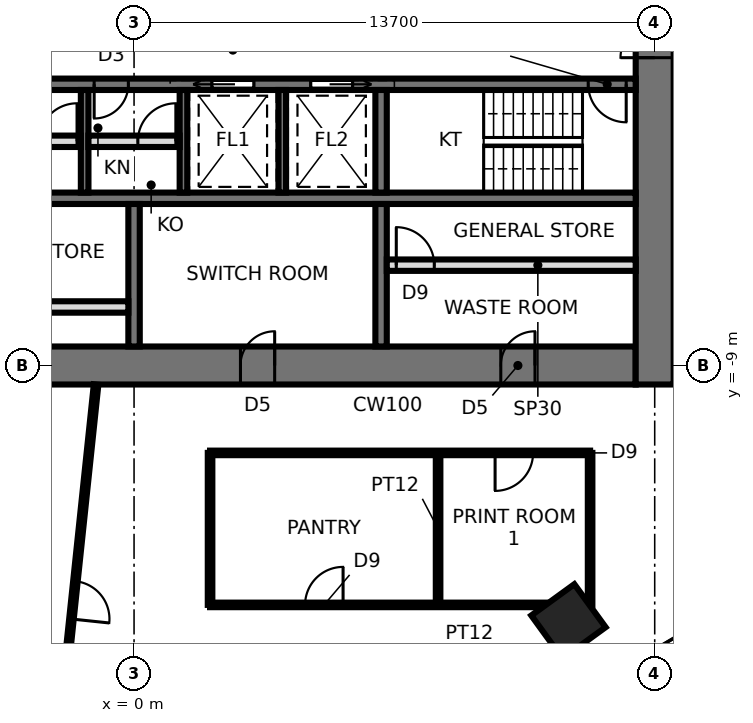
"""IFC4 building model, lengths in metres.
Left out: names, types, materials, properties, quantities, classifications, styles, units other than length and angle.
Written with IfcOpenShell. Run it as: python <this file> out.ifc"""

import sys

from ifc_helpers import new_model, si_unit, direction, frame, frame_2d, origin, origin_2d, place, context, subcontext, project, spatial, rectangle, extrude, element, fill, save


model = new_model("IFC4")
c1 = context("Model", 3, precision=1e-05, world=origin(), true_north=direction((0.0, 1.0)))
c2 = subcontext(c1, "Body", "Model", "MODEL_VIEW")
j1 = project(units=[si_unit("LENGTHUNIT", "METRE"), si_unit("PLANEANGLEUNIT", "RADIAN")], contexts=[c1])
p1 = place(None, origin())
s1 = spatial("IfcSite", under=j1, at=p1, CompositionType="ELEMENT")
p2 = place(p1, origin())
s2 = spatial("IfcBuilding", under=s1, at=p2, CompositionType="ELEMENT")
p3 = place(p2, frame((0.0, 0.0, 172.1)))
s3 = spatial("IfcBuildingStorey", under=s2, at=p3, CompositionType="ELEMENT", Elevation=172.1)
p4 = place(p3, frame((11.43, -15.733, 0.0), z_axis=(0.0, 0.0, 1.0), x_axis=(0.587785252292, -0.809016994375, 0.0)))
e1 = element("IfcColumn", 1, at=p4, inside=s3, PredefinedType="COLUMN", context=c2, shape_type="SweptSolid", body=[
    extrude(rectangle(XDim=1.4, YDim=1.4, at=origin_2d()), origin(), (0.0, 0.0, 1.0), 3.9),
])
p5 = place(p3, frame((-13.2, -9.0, 0.0), z_axis=(0.0, 0.0, 1.0), x_axis=(1.0, 0.0, 0.0)))
e2 = element("IfcWall", 2, at=p5, inside=s3, PredefinedType="SHEAR", context=c2, shape_type="SweptSolid", body=[
    extrude(rectangle(XDim=26.4, YDim=1.0, at=frame_2d((13.2, 0.0))), origin(), (0.0, 0.0, 1.0), 3.9),
])
p6 = place(p5, frame((2.65, 0.0, 0.0)))
e3 = element("IfcOpeningElement", 3, at=p6, cuts=e2, PredefinedType="OPENING", context=c2, shape_type="SweptSolid", body=[
    extrude(rectangle(XDim=0.9, YDim=2.1, at=frame_2d((0.45, 1.05))), frame((0.0, 0.51, 0.0), z_axis=(0.0, -1.0, 0.0), x_axis=(1.0, 0.0, 0.0)), (0.0, 0.0, 1.0), 1.02),
])
p7 = place(p5, frame((9.5, 0.0, 0.0)))
e4 = element("IfcOpeningElement", 4, at=p7, cuts=e2, PredefinedType="OPENING", context=c2, shape_type="SweptSolid", body=[
    extrude(rectangle(XDim=0.9, YDim=2.1, at=frame_2d((0.45, 1.05))), frame((0.0, 0.51, 0.0), z_axis=(0.0, -1.0, 0.0), x_axis=(1.0, 0.0, 0.0)), (0.0, 0.0, 1.0), 1.02),
])
p8 = place(p5, frame((16.0, 0.0, 0.0)))
e5 = element("IfcOpeningElement", 5, at=p8, cuts=e2, PredefinedType="OPENING", context=c2, shape_type="SweptSolid", body=[
    extrude(rectangle(XDim=0.9, YDim=2.1, at=frame_2d((0.45, 1.05))), frame((0.0, 0.51, 0.0), z_axis=(0.0, -1.0, 0.0), x_axis=(1.0, 0.0, 0.0)), (0.0, 0.0, 1.0), 1.02),
])
p9 = place(p5, frame((22.85, 0.0, 0.0)))
e6 = element("IfcOpeningElement", 6, at=p9, cuts=e2, PredefinedType="OPENING", context=c2, shape_type="SweptSolid", body=[
    extrude(rectangle(XDim=0.9, YDim=2.1, at=frame_2d((0.45, 1.05))), frame((0.0, 0.51, 0.0), z_axis=(0.0, -1.0, 0.0), x_axis=(1.0, 0.0, 0.0)), (0.0, 0.0, 1.0), 1.02),
])
p10 = place(p3, frame((13.7, -9.5, 0.0), z_axis=(0.0, 0.0, 1.0), x_axis=(0.0, 1.0, 0.0)))
e7 = element("IfcWall", 7, at=p10, inside=s3, PredefinedType="SHEAR", context=c2, shape_type="SweptSolid", body=[
    extrude(rectangle(XDim=19.0, YDim=1.0, at=frame_2d((9.5, 0.0))), origin(), (0.0, 0.0, 1.0), 3.9),
])
p11 = place(p10, frame((8.6, 0.0, 0.0)))
e8 = element("IfcOpeningElement", 8, at=p11, cuts=e7, PredefinedType="OPENING", context=c2, shape_type="SweptSolid", body=[
    extrude(rectangle(XDim=1.8, YDim=2.4, at=frame_2d((0.9, 1.2))), frame((0.0, 0.51, 0.0), z_axis=(0.0, -1.0, 0.0), x_axis=(1.0, 0.0, 0.0)), (0.0, 0.0, 1.0), 1.02),
])
p12 = place(p3, frame((-13.2, -1.6, 0.0), z_axis=(0.0, 0.0, 1.0), x_axis=(1.0, 0.0, 0.0)))
e9 = element("IfcWall", 9, at=p12, inside=s3, PredefinedType="SHEAR", context=c2, shape_type="SweptSolid", body=[
    extrude(rectangle(XDim=26.4, YDim=0.3, at=frame_2d((13.2, 0.0))), origin(), (0.0, 0.0, 1.0), 3.9),
])
p13 = place(p12, frame((25.15, 0.0, 0.0)))
e10 = element("IfcOpeningElement", 10, at=p13, cuts=e9, PredefinedType="OPENING", context=c2, shape_type="SweptSolid", body=[
    extrude(rectangle(XDim=1.0, YDim=2.1, at=frame_2d((0.5, 1.05))), frame((0.0, 0.16, 0.0), z_axis=(0.0, -1.0, 0.0), x_axis=(1.0, 0.0, 0.0)), (0.0, 0.0, 1.0), 0.32),
])
p14 = place(p12, frame((6.95, 0.0, 0.0)))
e11 = element("IfcOpeningElement", 11, at=p14, cuts=e9, PredefinedType="OPENING", context=c2, shape_type="SweptSolid", body=[
    extrude(rectangle(XDim=0.9, YDim=2.1, at=frame_2d((0.45, 1.05))), frame((0.0, 0.16, 0.0), z_axis=(0.0, -1.0, 0.0), x_axis=(1.0, 0.0, 0.0)), (0.0, 0.0, 1.0), 0.32),
])
p15 = place(p12, frame((9.55, 0.0, 0.0)))
e12 = element("IfcOpeningElement", 12, at=p15, cuts=e9, PredefinedType="OPENING", context=c2, shape_type="SweptSolid", body=[
    extrude(rectangle(XDim=0.9, YDim=2.1, at=frame_2d((0.45, 1.05))), frame((0.0, 0.16, 0.0), z_axis=(0.0, -1.0, 0.0), x_axis=(1.0, 0.0, 0.0)), (0.0, 0.0, 1.0), 0.32),
])
p16 = place(p12, frame((12.15, 0.0, 0.0)))
e13 = element("IfcOpeningElement", 13, at=p16, cuts=e9, PredefinedType="OPENING", context=c2, shape_type="SweptSolid", body=[
    extrude(rectangle(XDim=0.9, YDim=2.1, at=frame_2d((0.45, 1.05))), frame((0.0, 0.16, 0.0), z_axis=(0.0, -1.0, 0.0), x_axis=(1.0, 0.0, 0.0)), (0.0, 0.0, 1.0), 0.32),
])
p17 = place(p12, frame((15.25, 0.0, 0.0)))
e14 = element("IfcOpeningElement", 14, at=p17, cuts=e9, PredefinedType="OPENING", context=c2, shape_type="SweptSolid", body=[
    extrude(rectangle(XDim=1.1, YDim=2.3, at=frame_2d((0.55, 1.15))), frame((0.0, 0.16, 0.0), z_axis=(0.0, -1.0, 0.0), x_axis=(1.0, 0.0, 0.0)), (0.0, 0.0, 1.0), 0.32),
])
p18 = place(p12, frame((17.85, 0.0, 0.0)))
e15 = element("IfcOpeningElement", 15, at=p18, cuts=e9, PredefinedType="OPENING", context=c2, shape_type="SweptSolid", body=[
    extrude(rectangle(XDim=1.1, YDim=2.3, at=frame_2d((0.55, 1.15))), frame((0.0, 0.16, 0.0), z_axis=(0.0, -1.0, 0.0), x_axis=(1.0, 0.0, 0.0)), (0.0, 0.0, 1.0), 0.32),
])
p19 = place(p12, frame((4.85, 0.0, 0.0)))
e16 = element("IfcOpeningElement", 16, at=p19, cuts=e9, PredefinedType="OPENING", context=c2, shape_type="SweptSolid", body=[
    extrude(rectangle(XDim=1.1, YDim=2.3, at=frame_2d((0.55, 1.15))), frame((0.0, 0.16, 0.0), z_axis=(0.0, -1.0, 0.0), x_axis=(1.0, 0.0, 0.0)), (0.0, 0.0, 1.0), 0.32),
])
p20 = place(p12, frame((2.25, 0.0, 0.0)))
e17 = element("IfcOpeningElement", 17, at=p20, cuts=e9, PredefinedType="OPENING", context=c2, shape_type="SweptSolid", body=[
    extrude(rectangle(XDim=1.1, YDim=2.3, at=frame_2d((0.55, 1.15))), frame((0.0, 0.16, 0.0), z_axis=(0.0, -1.0, 0.0), x_axis=(1.0, 0.0, 0.0)), (0.0, 0.0, 1.0), 0.32),
])
p21 = place(p12, frame((0.35, 0.0, 0.0)))
e18 = element("IfcOpeningElement", 18, at=p21, cuts=e9, PredefinedType="OPENING", context=c2, shape_type="SweptSolid", body=[
    extrude(rectangle(XDim=0.9, YDim=2.1, at=frame_2d((0.45, 1.05))), frame((0.0, 0.16, 0.0), z_axis=(0.0, -1.0, 0.0), x_axis=(1.0, 0.0, 0.0)), (0.0, 0.0, 1.0), 0.32),
])
p22 = place(p3, frame((-13.2, -4.6, 0.0), z_axis=(0.0, 0.0, 1.0), x_axis=(1.0, 0.0, 0.0)))
e19 = element("IfcWall", 19, at=p22, inside=s3, PredefinedType="SHEAR", context=c2, shape_type="SweptSolid", body=[
    extrude(rectangle(XDim=26.4, YDim=0.3, at=frame_2d((13.2, 0.0))), origin(), (0.0, 0.0, 1.0), 3.9),
])
p23 = place(p3, frame((6.5, -1.75, 0.0), z_axis=(0.0, 0.0, 1.0), x_axis=(0.0, -1.0, 0.0)))
e20 = element("IfcWall", 20, at=p23, inside=s3, PredefinedType="SHEAR", context=c2, shape_type="SweptSolid", body=[
    extrude(rectangle(XDim=2.7, YDim=0.3, at=frame_2d((1.35, 0.0))), origin(), (0.0, 0.0, 1.0), 3.9),
])
p24 = place(p3, frame((6.5, -4.75, 0.0), z_axis=(0.0, 0.0, 1.0), x_axis=(0.0, -1.0, 0.0)))
e21 = element("IfcWall", 21, at=p24, inside=s3, PredefinedType="SHEAR", context=c2, shape_type="SweptSolid", body=[
    extrude(rectangle(XDim=3.75, YDim=0.3, at=frame_2d((1.875, 0.0))), origin(), (0.0, 0.0, 1.0), 3.9),
])
for number, where, z_axis, x_axis in (
    (22, (-1.3, -1.75, 0.0), (0.0, 0.0, 1.0), (0.0, -1.0, 0.0)),
    (23, (1.3, -1.75, 0.0), (0.0, 0.0, 1.0), (0.0, -1.0, 0.0)),
    (24, (3.9, -1.75, 0.0), (0.0, 0.0, 1.0), (0.0, -1.0, 0.0)),
):
    element("IfcWall", number, at=place(p3, frame(where, z_axis=z_axis, x_axis=x_axis)), inside=s3, PredefinedType="SHEAR", context=c2, shape_type="SweptSolid", body=[
        extrude(rectangle(XDim=2.7, YDim=0.2, at=frame_2d((1.35, 0.0))), origin(), (0.0, 0.0, 1.0), 3.9),
    ])
p25 = place(p3, frame((0.0, -4.75, 0.0), z_axis=(0.0, 0.0, 1.0), x_axis=(0.0, -1.0, 0.0)))
e25 = element("IfcWall", 25, at=p25, inside=s3, PredefinedType="SHEAR", context=c2, shape_type="SweptSolid", body=[
    extrude(rectangle(XDim=3.75, YDim=0.3, at=frame_2d((1.875, 0.0))), origin(), (0.0, 0.0, 1.0), 3.9),
])
p26 = place(p3, frame((-3.8, -3.1, 0.0), z_axis=(0.0, 0.0, 1.0), x_axis=(1.0, 0.0, 0.0)))
e26 = element("IfcWall", 26, at=p26, inside=s3, PredefinedType="PARTITIONING", context=c2, shape_type="SweptSolid", body=[
    extrude(rectangle(XDim=2.4, YDim=0.3, at=frame_2d((1.2, 0.0))), origin(), (0.0, 0.0, 1.0), 3.74),
])
p27 = place(p26, frame((1.3, 0.0, 0.0)))
e27 = element("IfcOpeningElement", 27, at=p27, cuts=e26, PredefinedType="OPENING", context=c2, shape_type="SweptSolid", body=[
    extrude(rectangle(XDim=1.0, YDim=2.4, at=frame_2d((0.5, 1.2))), frame((0.0, 0.16, 0.0), z_axis=(0.0, -1.0, 0.0), x_axis=(1.0, 0.0, 0.0)), (0.0, 0.0, 1.0), 0.32),
])
p28 = place(p3, frame((-1.2, -3.1, 0.0), z_axis=(0.0, 0.0, 1.0), x_axis=(1.0, 0.0, 0.0)))
e28 = element("IfcWall", 28, at=p28, inside=s3, PredefinedType="PARTITIONING", context=c2, shape_type="SweptSolid", body=[
    extrude(rectangle(XDim=2.4, YDim=0.3, at=frame_2d((1.2, 0.0))), origin(), (0.0, 0.0, 1.0), 3.74),
])
p29 = place(p28, frame((1.3, 0.0, 0.0)))
e29 = element("IfcOpeningElement", 29, at=p29, cuts=e28, PredefinedType="OPENING", context=c2, shape_type="SweptSolid", body=[
    extrude(rectangle(XDim=1.0, YDim=2.4, at=frame_2d((0.5, 1.2))), frame((0.0, 0.16, 0.0), z_axis=(0.0, -1.0, 0.0), x_axis=(1.0, 0.0, 0.0)), (0.0, 0.0, 1.0), 0.32),
])
p30 = place(p3, frame((-6.35, -7.46, 0.0), z_axis=(0.0, 0.0, 1.0), x_axis=(1.0, 0.0, 0.0)))
e30 = element("IfcWall", 30, at=p30, inside=s3, PredefinedType="PARTITIONING", context=c2, shape_type="SweptSolid", body=[
    extrude(rectangle(XDim=6.2, YDim=0.3, at=frame_2d((3.1, 0.0))), origin(), (0.0, 0.0, 1.0), 3.74),
])
p31 = place(p30, frame((0.25, 0.0, 0.0)))
e31 = element("IfcOpeningElement", 31, at=p31, cuts=e30, PredefinedType="OPENING", context=c2, shape_type="SweptSolid", body=[
    extrude(rectangle(XDim=1.0, YDim=2.4, at=frame_2d((0.5, 1.2))), frame((0.0, 0.16, 0.0), z_axis=(0.0, -1.0, 0.0), x_axis=(1.0, 0.0, 0.0)), (0.0, 0.0, 1.0), 0.32),
])
p32 = place(p3, frame((6.65, -6.36, 0.0), z_axis=(0.0, 0.0, 1.0), x_axis=(1.0, 0.0, 0.0)))
e32 = element("IfcWall", 32, at=p32, inside=s3, PredefinedType="PARTITIONING", context=c2, shape_type="SweptSolid", body=[
    extrude(rectangle(XDim=6.55, YDim=0.3, at=frame_2d((3.275, 0.0))), origin(), (0.0, 0.0, 1.0), 3.74),
])
p33 = place(p32, frame((0.25, 0.0, 0.0)))
e33 = element("IfcOpeningElement", 33, at=p33, cuts=e32, PredefinedType="OPENING", context=c2, shape_type="SweptSolid", body=[
    extrude(rectangle(XDim=1.0, YDim=2.4, at=frame_2d((0.5, 1.2))), frame((0.0, 0.16, 0.0), z_axis=(0.0, -1.0, 0.0), x_axis=(1.0, 0.0, 0.0)), (0.0, 0.0, 1.0), 0.32),
])
p34 = place(p3, frame((-2.196, -20.896, 0.0), z_axis=(0.0, 0.0, 1.0), x_axis=(0.104527293836, 0.99452201828, 0.0)))
e34 = element("IfcWall", 34, at=p34, inside=s3, PredefinedType="PARTITIONING", context=c2, shape_type="SweptSolid", body=[
    extrude(rectangle(XDim=11.459, YDim=0.12, at=frame_2d((5.729, 0.0))), origin(), (0.0, 0.0, 1.0), 3.74),
])
p35 = place(p34, frame((5.254, 0.0, 0.0)))
e35 = element("IfcOpeningElement", 35, at=p35, cuts=e34, PredefinedType="OPENING", context=c2, shape_type="SweptSolid", body=[
    extrude(rectangle(XDim=1.0, YDim=2.4, at=frame_2d((0.5, 1.2))), frame((0.0, 0.07, 0.0), z_axis=(0.0, -1.0, 0.0), x_axis=(1.0, 0.0, 0.0)), (0.0, 0.0, 1.0), 0.14),
])
p36 = place(p3, frame((2.0, -15.3, 0.0), z_axis=(0.0, 0.0, 1.0), x_axis=(0.0, 1.0, 0.0)))
e36 = element("IfcWall", 36, at=p36, inside=s3, PredefinedType="PARTITIONING", context=c2, shape_type="SweptSolid", body=[
    extrude(rectangle(XDim=4.0, YDim=0.12, at=frame_2d((2.0, 0.0))), origin(), (0.0, 0.0, 1.0), 3.74),
])
p37 = place(p3, frame((12.0, -15.3, 0.0), z_axis=(0.0, 0.0, 1.0), x_axis=(-1.0, 0.0, 0.0)))
e37 = element("IfcWall", 37, at=p37, inside=s3, PredefinedType="PARTITIONING", context=c2, shape_type="SweptSolid", body=[
    extrude(rectangle(XDim=10.0, YDim=0.12, at=frame_2d((5.0, 0.0))), origin(), (0.0, 0.0, 1.0), 3.334),
])
p38 = place(p37, frame((6.5, 0.0, 0.0)))
e38 = element("IfcOpeningElement", 38, at=p38, cuts=e37, PredefinedType="OPENING", context=c2, shape_type="SweptSolid", body=[
    extrude(rectangle(XDim=1.0, YDim=2.4, at=frame_2d((0.5, 1.2))), frame((0.0, 0.07, 0.0), z_axis=(0.0, -1.0, 0.0), x_axis=(1.0, 0.0, 0.0)), (0.0, 0.0, 1.0), 0.14),
])
p39 = place(p3, frame((8.0, -11.3, 0.0), z_axis=(0.0, 0.0, 1.0), x_axis=(0.0, -1.0, 0.0)))
e39 = element("IfcWall", 39, at=p39, inside=s3, PredefinedType="PARTITIONING", context=c2, shape_type="SweptSolid", body=[
    extrude(rectangle(XDim=4.0, YDim=0.12, at=frame_2d((2.0, 0.0))), origin(), (0.0, 0.0, 1.0), 3.74),
])
p40 = place(p3, frame((2.0, -11.3, 0.0), z_axis=(0.0, 0.0, 1.0), x_axis=(1.0, 0.0, 0.0)))
e40 = element("IfcWall", 40, at=p40, inside=s3, PredefinedType="PARTITIONING", context=c2, shape_type="SweptSolid", body=[
    extrude(rectangle(XDim=10.0, YDim=0.12, at=frame_2d((5.0, 0.0))), origin(), (0.0, 0.0, 1.0), 3.74),
])
p41 = place(p40, frame((7.5, 0.0, 0.0)))
e41 = element("IfcOpeningElement", 41, at=p41, cuts=e40, PredefinedType="OPENING", context=c2, shape_type="SweptSolid", body=[
    extrude(rectangle(XDim=1.0, YDim=2.4, at=frame_2d((0.5, 1.2))), frame((0.0, 0.07, 0.0), z_axis=(0.0, -1.0, 0.0), x_axis=(1.0, 0.0, 0.0)), (0.0, 0.0, 1.0), 0.14),
])
p42 = place(p3, frame((12.0, -11.3, 0.0), z_axis=(0.0, 0.0, 1.0), x_axis=(0.0, -1.0, 0.0)))
e42 = element("IfcWall", 42, at=p42, inside=s3, PredefinedType="PARTITIONING", context=c2, shape_type="SweptSolid", body=[
    extrude(rectangle(XDim=4.0, YDim=0.12, at=frame_2d((2.0, 0.0))), origin(), (0.0, 0.0, 1.0), 3.74),
])
p43 = place(p11, origin())
e43 = element("IfcDoor", 43, at=p43, inside=s3, OperationType="DOUBLE_DOOR_SINGLE_SWING", PredefinedType="DOOR", context=c2, shape_type="SweptSolid", body=[
    extrude(rectangle(XDim=1.72, YDim=2.36, at=frame_2d((0.9, 1.18))), frame((0.0, 0.025, 0.0), z_axis=(0.0, -1.0, 0.0), x_axis=(1.0, 0.0, 0.0)), (0.0, 0.0, 1.0), 0.05),
    extrude(rectangle(XDim=0.04, YDim=2.4, at=frame_2d((0.02, 1.2))), frame((0.0, 0.25, 0.0), z_axis=(0.0, -1.0, 0.0), x_axis=(1.0, 0.0, 0.0)), (0.0, 0.0, 1.0), 0.5),
    extrude(rectangle(XDim=0.04, YDim=2.4, at=frame_2d((1.78, 1.2))), frame((0.0, 0.25, 0.0), z_axis=(0.0, -1.0, 0.0), x_axis=(1.0, 0.0, 0.0)), (0.0, 0.0, 1.0), 0.5),
    extrude(rectangle(XDim=1.72, YDim=0.04, at=frame_2d((0.9, 2.38))), frame((0.0, 0.25, 0.0), z_axis=(0.0, -1.0, 0.0), x_axis=(1.0, 0.0, 0.0)), (0.0, 0.0, 1.0), 0.5),
])
fill(e8, e43)
p44 = place(p13, frame((1.0, 0.0, 0.0), z_axis=(0.0, 0.0, 1.0), x_axis=(-1.0, 0.0, 0.0)))
e44 = element("IfcDoor", 44, at=p44, inside=s3, OperationType="SINGLE_SWING_LEFT", PredefinedType="DOOR", context=c2, shape_type="SweptSolid", body=[
    extrude(rectangle(XDim=1.0, YDim=2.1, at=frame_2d((0.5, 1.05))), frame((0.0, 0.025, 0.0), z_axis=(0.0, -1.0, 0.0), x_axis=(1.0, 0.0, 0.0)), (0.0, 0.0, 1.0), 0.05),
])
fill(e10, e44)
p45 = place(p27, origin())
e45 = element("IfcDoor", 45, at=p45, inside=s3, OperationType="SINGLE_SWING_RIGHT", PredefinedType="DOOR", context=c2, shape_type="SweptSolid", body=[
    extrude(rectangle(XDim=1.0, YDim=2.4, at=frame_2d((0.5, 1.2))), frame((0.0, 0.025, 0.0), z_axis=(0.0, -1.0, 0.0), x_axis=(1.0, 0.0, 0.0)), (0.0, 0.0, 1.0), 0.05),
])
fill(e27, e45)
p46 = place(p29, origin())
e46 = element("IfcDoor", 46, at=p46, inside=s3, OperationType="SINGLE_SWING_RIGHT", PredefinedType="DOOR", context=c2, shape_type="SweptSolid", body=[
    extrude(rectangle(XDim=1.0, YDim=2.4, at=frame_2d((0.5, 1.2))), frame((0.0, 0.025, 0.0), z_axis=(0.0, -1.0, 0.0), x_axis=(1.0, 0.0, 0.0)), (0.0, 0.0, 1.0), 0.05),
])
fill(e29, e46)
p47 = place(p16, frame((0.9, 0.0, 0.0), z_axis=(0.0, 0.0, 1.0), x_axis=(-1.0, 0.0, 0.0)))
e47 = element("IfcDoor", 47, at=p47, inside=s3, OperationType="SINGLE_SWING_RIGHT", PredefinedType="DOOR", context=c2, shape_type="SweptSolid", body=[
    extrude(rectangle(XDim=0.9, YDim=2.1, at=frame_2d((0.45, 1.05))), frame((0.0, 0.025, 0.0), z_axis=(0.0, -1.0, 0.0), x_axis=(1.0, 0.0, 0.0)), (0.0, 0.0, 1.0), 0.05),
])
fill(e13, e47)
p48 = place(p17, frame((1.1, 0.0, 0.0), z_axis=(0.0, 0.0, 1.0), x_axis=(-1.0, 0.0, 0.0)))
e48 = element("IfcDoor", 48, at=p48, inside=s3, OperationType="SLIDING_TO_RIGHT", PredefinedType="DOOR", context=c2, shape_type="SweptSolid", body=[
    extrude(rectangle(XDim=1.1, YDim=2.3, at=frame_2d((0.55, 1.15))), frame((0.0, 0.025, 0.0), z_axis=(0.0, -1.0, 0.0), x_axis=(1.0, 0.0, 0.0)), (0.0, 0.0, 1.0), 0.05),
])
fill(e14, e48)
p49 = place(p18, frame((1.1, 0.0, 0.0), z_axis=(0.0, 0.0, 1.0), x_axis=(-1.0, 0.0, 0.0)))
e49 = element("IfcDoor", 49, at=p49, inside=s3, OperationType="SLIDING_TO_LEFT", PredefinedType="DOOR", context=c2, shape_type="SweptSolid", body=[
    extrude(rectangle(XDim=1.1, YDim=2.3, at=frame_2d((0.55, 1.15))), frame((0.0, 0.025, 0.0), z_axis=(0.0, -1.0, 0.0), x_axis=(1.0, 0.0, 0.0)), (0.0, 0.0, 1.0), 0.05),
])
fill(e15, e49)
p50 = place(p8, origin())
e50 = element("IfcDoor", 50, at=p50, inside=s3, OperationType="SINGLE_SWING_RIGHT", PredefinedType="DOOR", context=c2, shape_type="SweptSolid", body=[
    extrude(rectangle(XDim=0.82, YDim=2.06, at=frame_2d((0.45, 1.03))), frame((0.0, 0.025, 0.0), z_axis=(0.0, -1.0, 0.0), x_axis=(1.0, 0.0, 0.0)), (0.0, 0.0, 1.0), 0.05),
    extrude(rectangle(XDim=0.04, YDim=2.1, at=frame_2d((0.02, 1.05))), frame((0.0, 0.25, 0.0), z_axis=(0.0, -1.0, 0.0), x_axis=(1.0, 0.0, 0.0)), (0.0, 0.0, 1.0), 0.5),
    extrude(rectangle(XDim=0.04, YDim=2.1, at=frame_2d((0.88, 1.05))), frame((0.0, 0.25, 0.0), z_axis=(0.0, -1.0, 0.0), x_axis=(1.0, 0.0, 0.0)), (0.0, 0.0, 1.0), 0.5),
    extrude(rectangle(XDim=0.82, YDim=0.04, at=frame_2d((0.45, 2.08))), frame((0.0, 0.25, 0.0), z_axis=(0.0, -1.0, 0.0), x_axis=(1.0, 0.0, 0.0)), (0.0, 0.0, 1.0), 0.5),
])
fill(e5, e50)
p51 = place(p9, origin())
e51 = element("IfcDoor", 51, at=p51, inside=s3, OperationType="SINGLE_SWING_RIGHT", PredefinedType="DOOR", context=c2, shape_type="SweptSolid", body=[
    extrude(rectangle(XDim=0.82, YDim=2.06, at=frame_2d((0.45, 1.03))), frame((0.0, 0.025, 0.0), z_axis=(0.0, -1.0, 0.0), x_axis=(1.0, 0.0, 0.0)), (0.0, 0.0, 1.0), 0.05),
    extrude(rectangle(XDim=0.04, YDim=2.1, at=frame_2d((0.02, 1.05))), frame((0.0, 0.25, 0.0), z_axis=(0.0, -1.0, 0.0), x_axis=(1.0, 0.0, 0.0)), (0.0, 0.0, 1.0), 0.5),
    extrude(rectangle(XDim=0.04, YDim=2.1, at=frame_2d((0.88, 1.05))), frame((0.0, 0.25, 0.0), z_axis=(0.0, -1.0, 0.0), x_axis=(1.0, 0.0, 0.0)), (0.0, 0.0, 1.0), 0.5),
    extrude(rectangle(XDim=0.82, YDim=0.04, at=frame_2d((0.45, 2.08))), frame((0.0, 0.25, 0.0), z_axis=(0.0, -1.0, 0.0), x_axis=(1.0, 0.0, 0.0)), (0.0, 0.0, 1.0), 0.5),
])
fill(e6, e51)
p52 = place(p33, origin())
e52 = element("IfcDoor", 52, at=p52, inside=s3, OperationType="SINGLE_SWING_LEFT", PredefinedType="DOOR", context=c2, shape_type="SweptSolid", body=[
    extrude(rectangle(XDim=1.0, YDim=2.4, at=frame_2d((0.5, 1.2))), frame((0.0, 0.025, 0.0), z_axis=(0.0, -1.0, 0.0), x_axis=(1.0, 0.0, 0.0)), (0.0, 0.0, 1.0), 0.05),
])
fill(e33, e52)
p53 = place(p38, frame((1.0, 0.0, 0.0), z_axis=(0.0, 0.0, 1.0), x_axis=(-1.0, 0.0, 0.0)))
e53 = element("IfcDoor", 53, at=p53, inside=s3, OperationType="SINGLE_SWING_RIGHT", PredefinedType="DOOR", context=c2, shape_type="SweptSolid", body=[
    extrude(rectangle(XDim=1.0, YDim=2.4, at=frame_2d((0.5, 1.2))), frame((0.0, 0.025, 0.0), z_axis=(0.0, -1.0, 0.0), x_axis=(1.0, 0.0, 0.0)), (0.0, 0.0, 1.0), 0.05),
])
fill(e38, e53)
p54 = place(p41, frame((1.0, 0.0, 0.0), z_axis=(0.0, 0.0, 1.0), x_axis=(-1.0, 0.0, 0.0)))
e54 = element("IfcDoor", 54, at=p54, inside=s3, OperationType="SINGLE_SWING_RIGHT", PredefinedType="DOOR", context=c2, shape_type="SweptSolid", body=[
    extrude(rectangle(XDim=1.0, YDim=2.4, at=frame_2d((0.5, 1.2))), frame((0.0, 0.025, 0.0), z_axis=(0.0, -1.0, 0.0), x_axis=(1.0, 0.0, 0.0)), (0.0, 0.0, 1.0), 0.05),
])
fill(e41, e54)
p55 = place(p35, frame((1.0, 0.0, 0.0), z_axis=(0.0, 0.0, 1.0), x_axis=(-1.0, 0.0, 0.0)))
e55 = element("IfcDoor", 55, at=p55, inside=s3, OperationType="SINGLE_SWING_RIGHT", PredefinedType="DOOR", context=c2, shape_type="SweptSolid", body=[
    extrude(rectangle(XDim=1.0, YDim=2.4, at=frame_2d((0.5, 1.2))), frame((0.0, 0.025, 0.0), z_axis=(0.0, -1.0, 0.0), x_axis=(1.0, 0.0, 0.0)), (0.0, 0.0, 1.0), 0.05),
])
fill(e35, e55)
save(model, sys.argv[1])
